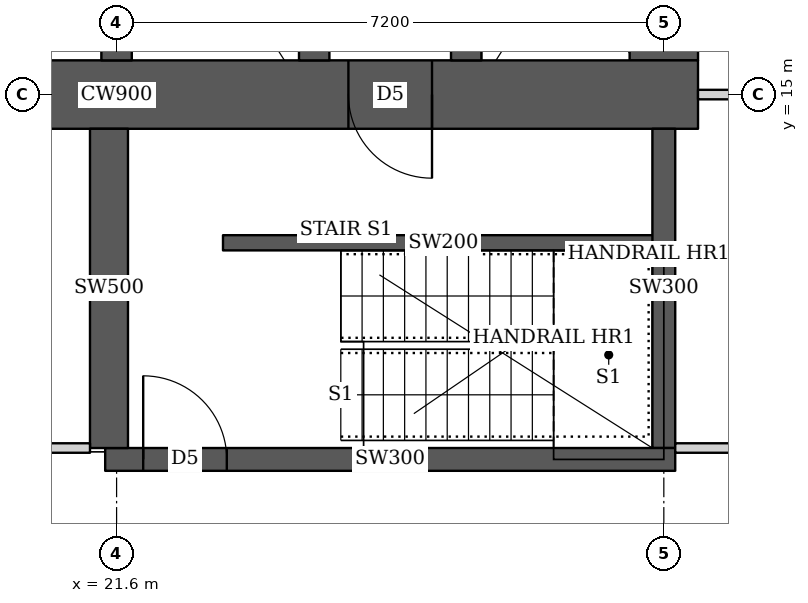
"""IFC4 building model, lengths in metres.
Left out: names, types, materials, properties, quantities, classifications, styles, units other than length and angle.
Written with IfcOpenShell. Run it as: python <this file> out.ifc"""

import sys

from ifc_helpers import new_model, si_unit, direction, frame, frame_2d, origin, place, context, subcontext, project, spatial, rectangle, extrude, element, fill, save


model = new_model("IFC4")
c1 = context("Model", 3, precision=1e-05, world=origin(), true_north=direction((0.0, 1.0)))
c2 = subcontext(c1, "Body", "Model", "MODEL_VIEW")
j1 = project(units=[si_unit("LENGTHUNIT", "METRE"), si_unit("PLANEANGLEUNIT", "RADIAN")], contexts=[c1])
p1 = place(None, origin())
s1 = spatial("IfcSite", under=j1, at=p1, CompositionType="ELEMENT")
p2 = place(p1, origin())
s2 = spatial("IfcBuilding", under=s1, at=p2, CompositionType="ELEMENT")
p3 = place(p2, frame((0.0, 0.0, 204.95)))
s3 = spatial("IfcBuildingStorey", under=s2, at=p3, CompositionType="ELEMENT", Elevation=204.95)
p4 = place(p3, frame((13.95, 15.0, 0.0), z_axis=(0.0, 0.0, 1.0), x_axis=(1.0, 0.0, 0.0)))
e1 = element("IfcWall", 1, at=p4, inside=s3, PredefinedType="SHEAR", context=c2, shape_type="SweptSolid", body=[
    extrude(rectangle(XDim=15.3, YDim=0.9, at=frame_2d((7.65, 0.0))), origin(), (0.0, 0.0, 1.0), 3.75),
])
p5 = place(p4, frame((4.45, 0.0, 0.0)))
e2 = element("IfcOpeningElement", 2, at=p5, cuts=e1, PredefinedType="OPENING", context=c2, shape_type="SweptSolid", body=[
    extrude(rectangle(XDim=1.8, YDim=2.1, at=frame_2d((0.9, 1.05))), frame((0.0, 0.46, 0.0), z_axis=(0.0, -1.0, 0.0), x_axis=(1.0, 0.0, 0.0)), (0.0, 0.0, 1.0), 0.92),
])
p6 = place(p4, frame((10.7, 0.0, 0.0)))
e3 = element("IfcOpeningElement", 3, at=p6, cuts=e1, PredefinedType="OPENING", context=c2, shape_type="SweptSolid", body=[
    extrude(rectangle(XDim=1.1, YDim=2.1, at=frame_2d((0.55, 1.05))), frame((0.0, 0.46, 0.0), z_axis=(0.0, -1.0, 0.0), x_axis=(1.0, 0.0, 0.0)), (0.0, 0.0, 1.0), 0.92),
])
p7 = place(p3, frame((28.8, 15.45, 0.0), z_axis=(0.0, 0.0, 1.0), x_axis=(0.0, 1.0, 0.0)))
e4 = element("IfcWall", 4, at=p7, inside=s3, PredefinedType="SHEAR", context=c2, shape_type="SweptSolid", body=[
    extrude(rectangle(XDim=14.1, YDim=0.9, at=frame_2d((7.05, 0.0))), origin(), (0.0, 0.0, 1.0), 3.75),
])
p8 = place(p3, frame((21.6, 15.45, 0.0), z_axis=(0.0, 0.0, 1.0), x_axis=(0.0, 1.0, 0.0)))
e5 = element("IfcWall", 5, at=p8, inside=s3, PredefinedType="SHEAR", context=c2, shape_type="SweptSolid", body=[
    extrude(rectangle(XDim=14.1, YDim=0.4, at=frame_2d((7.05, 0.0))), origin(), (0.0, 0.0, 1.0), 3.75),
])
p9 = place(p8, frame((0.875, 0.0, 0.0)))
e6 = element("IfcOpeningElement", 6, at=p9, cuts=e5, PredefinedType="OPENING", context=c2, shape_type="SweptSolid", body=[
    extrude(rectangle(XDim=1.1, YDim=2.1, at=frame_2d((0.55, 1.05))), frame((0.0, 0.21, 0.0), z_axis=(0.0, -1.0, 0.0), x_axis=(1.0, 0.0, 0.0)), (0.0, 0.0, 1.0), 0.42),
])
p10 = place(p8, frame((4.625, 0.0, 0.0)))
e7 = element("IfcOpeningElement", 7, at=p10, cuts=e5, PredefinedType="OPENING", context=c2, shape_type="SweptSolid", body=[
    extrude(rectangle(XDim=1.1, YDim=2.1, at=frame_2d((0.55, 1.05))), frame((0.0, 0.21, 0.0), z_axis=(0.0, -1.0, 0.0), x_axis=(1.0, 0.0, 0.0)), (0.0, 0.0, 1.0), 0.42),
])
p11 = place(p8, frame((8.375, 0.0, 0.0)))
e8 = element("IfcOpeningElement", 8, at=p11, cuts=e5, PredefinedType="OPENING", context=c2, shape_type="SweptSolid", body=[
    extrude(rectangle(XDim=1.1, YDim=2.1, at=frame_2d((0.55, 1.05))), frame((0.0, 0.21, 0.0), z_axis=(0.0, -1.0, 0.0), x_axis=(1.0, 0.0, 0.0)), (0.0, 0.0, 1.0), 0.42),
])
p12 = place(p8, frame((12.125, 0.0, 0.0)))
e9 = element("IfcOpeningElement", 9, at=p12, cuts=e5, PredefinedType="OPENING", context=c2, shape_type="SweptSolid", body=[
    extrude(rectangle(XDim=1.1, YDim=2.1, at=frame_2d((0.55, 1.05))), frame((0.0, 0.21, 0.0), z_axis=(0.0, -1.0, 0.0), x_axis=(1.0, 0.0, 0.0)), (0.0, 0.0, 1.0), 0.42),
])
p13 = place(p3, frame((24.2, 15.45, 0.0), z_axis=(0.0, 0.0, 1.0), x_axis=(0.0, 1.0, 0.0)))
e10 = element("IfcWall", 10, at=p13, inside=s3, PredefinedType="SHEAR", context=c2, shape_type="SweptSolid", body=[
    extrude(rectangle(XDim=14.1, YDim=0.4, at=frame_2d((7.05, 0.0))), origin(), (0.0, 0.0, 1.0), 3.75),
])
p14 = place(p3, frame((26.2, 15.45, 0.0), z_axis=(0.0, 0.0, 1.0), x_axis=(0.0, 1.0, 0.0)))
e11 = element("IfcWall", 11, at=p14, inside=s3, PredefinedType="SHEAR", context=c2, shape_type="SweptSolid", body=[
    extrude(rectangle(XDim=3.1, YDim=0.4, at=frame_2d((1.55, 0.0))), origin(), (0.0, 0.0, 1.0), 3.75),
])
p15 = place(p14, frame((0.825, 0.0, 0.0)))
e12 = element("IfcOpeningElement", 12, at=p15, cuts=e11, PredefinedType="OPENING", context=c2, shape_type="SweptSolid", body=[
    extrude(rectangle(XDim=1.2, YDim=2.1, at=frame_2d((0.6, 1.05))), frame((0.0, 0.21, 0.0), z_axis=(0.0, -1.0, 0.0), x_axis=(1.0, 0.0, 0.0)), (0.0, 0.0, 1.0), 0.42),
])
p16 = place(p3, frame((21.45, 10.2, 0.0), z_axis=(0.0, 0.0, 1.0), x_axis=(1.0, 0.0, 0.0)))
e13 = element("IfcWall", 13, at=p16, inside=s3, PredefinedType="SHEAR", context=c2, shape_type="SweptSolid", body=[
    extrude(rectangle(XDim=7.5, YDim=0.3, at=frame_2d((3.75, 0.0))), origin(), (0.0, 0.0, 1.0), 3.75),
])
p17 = place(p16, frame((0.5, 0.0, 0.0)))
e14 = element("IfcOpeningElement", 14, at=p17, cuts=e13, PredefinedType="OPENING", context=c2, shape_type="SweptSolid", body=[
    extrude(rectangle(XDim=1.1, YDim=2.1, at=frame_2d((0.55, 1.05))), frame((0.0, 0.16, 0.0), z_axis=(0.0, -1.0, 0.0), x_axis=(1.0, 0.0, 0.0)), (0.0, 0.0, 1.0), 0.32),
])
p18 = place(p3, frame((21.5, 10.35, 0.0), z_axis=(0.0, 0.0, 1.0), x_axis=(0.0, 1.0, 0.0)))
e15 = element("IfcWall", 15, at=p18, inside=s3, PredefinedType="SHEAR", context=c2, shape_type="SweptSolid", body=[
    extrude(rectangle(XDim=4.2, YDim=0.5, at=frame_2d((2.1, 0.0))), origin(), (0.0, 0.0, 1.0), 3.75),
])
p19 = place(p3, frame((28.8, 10.35, 0.0), z_axis=(0.0, 0.0, 1.0), x_axis=(0.0, 1.0, 0.0)))
e16 = element("IfcWall", 16, at=p19, inside=s3, PredefinedType="SHEAR", context=c2, shape_type="SweptSolid", body=[
    extrude(rectangle(XDim=4.2, YDim=0.3, at=frame_2d((2.1, 0.0))), origin(), (0.0, 0.0, 1.0), 3.75),
])
p20 = place(p3, frame((10.713, 10.35, 0.0), z_axis=(0.0, 0.0, 1.0), x_axis=(1.0, 0.0, 0.0)))
e17 = element("IfcWall", 17, at=p20, inside=s3, PredefinedType="PARTITIONING", context=c2, shape_type="SweptSolid", body=[
    extrude(rectangle(XDim=10.537, YDim=0.125, at=frame_2d((5.269, 0.0))), origin(), (0.0, 0.0, 1.0), 3.5),
])
p21 = place(p20, frame((7.282, 0.0, 0.0)))
e18 = element("IfcOpeningElement", 18, at=p21, cuts=e17, PredefinedType="OPENING", context=c2, shape_type="SweptSolid", body=[
    extrude(rectangle(XDim=1.8, YDim=2.1, at=frame_2d((0.9, 1.05))), frame((0.0, 0.073, 0.0), z_axis=(0.0, -1.0, 0.0), x_axis=(1.0, 0.0, 0.0)), (0.0, 0.0, 1.0), 0.145),
])
p22 = place(p3, frame((28.95, 10.35, 0.0), z_axis=(0.0, 0.0, 1.0), x_axis=(1.0, 0.0, 0.0)))
e19 = element("IfcWall", 19, at=p22, inside=s3, PredefinedType="PARTITIONING", context=c2, shape_type="SweptSolid", body=[
    extrude(rectangle(XDim=8.886, YDim=0.125, at=frame_2d((4.443, 0.0))), origin(), (0.0, 0.0, 1.0), 3.5),
])
p23 = place(p3, frame((29.25, 15.0, 0.0), z_axis=(0.0, 0.0, 1.0), x_axis=(1.0, 0.0, 0.0)))
e20 = element("IfcWall", 20, at=p23, inside=s3, PredefinedType="PARTITIONING", context=c2, shape_type="SweptSolid", body=[
    extrude(rectangle(XDim=6.049, YDim=0.125, at=frame_2d((3.024, 0.0))), origin(), (0.0, 0.0, 1.0), 3.5),
])
p24 = place(p3, frame((23.0, 13.05, 0.0), z_axis=(0.0, 0.0, 1.0), x_axis=(1.0, 0.0, 0.0)))
e21 = element("IfcWall", 21, at=p24, inside=s3, PredefinedType="SHEAR", context=c2, shape_type="SweptSolid", body=[
    extrude(rectangle(XDim=5.8, YDim=0.2, at=frame_2d((2.9, 0.0))), origin(), (0.0, 0.0, 1.0), 3.75),
])
p25 = place(p6, origin())
e22 = element("IfcDoor", 22, at=p25, inside=s3, OperationType="SINGLE_SWING_LEFT", PredefinedType="DOOR", context=c2, shape_type="SweptSolid", body=[
    extrude(rectangle(XDim=1.1, YDim=2.1, at=frame_2d((0.55, 1.05))), frame((0.0, 0.025, 0.0), z_axis=(0.0, -1.0, 0.0), x_axis=(1.0, 0.0, 0.0)), (0.0, 0.0, 1.0), 0.05),
])
fill(e3, e22)
p26 = place(p17, origin())
e23 = element("IfcDoor", 23, at=p26, inside=s3, OperationType="SINGLE_SWING_LEFT", PredefinedType="DOOR", context=c2, shape_type="SweptSolid", body=[
    extrude(rectangle(XDim=1.1, YDim=2.1, at=frame_2d((0.55, 1.05))), frame((0.0, 0.025, 0.0), z_axis=(0.0, -1.0, 0.0), x_axis=(1.0, 0.0, 0.0)), (0.0, 0.0, 1.0), 0.05),
])
fill(e14, e23)
save(model, sys.argv[1])
